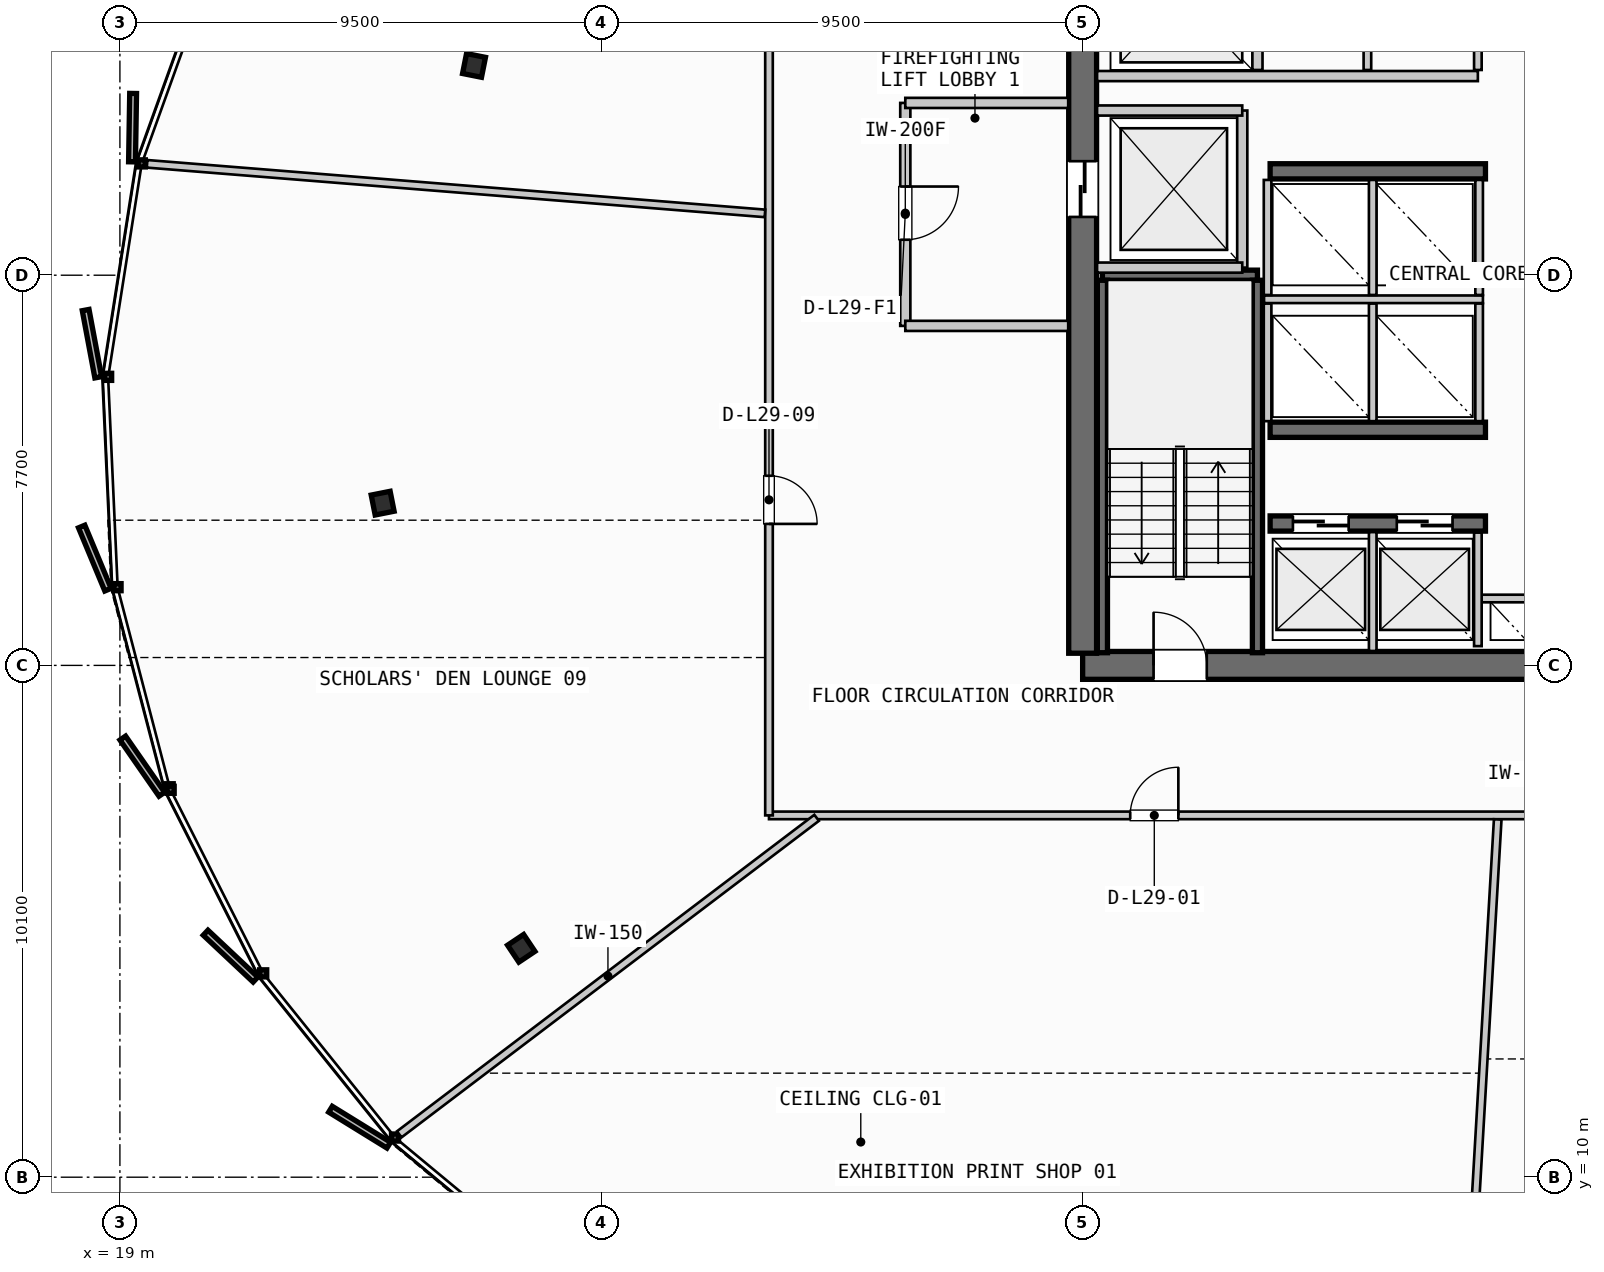
"""IFC4 building model, lengths in metres.
Left out: names, types, materials, properties, quantities, classifications, styles, units other than length and angle.
Written with IfcOpenShell. Run it as: python <this file> out.ifc"""

import sys

from ifc_helpers import new_model, si_unit, direction, frame, frame_2d, origin, origin_2d, place, context, subcontext, project, spatial, rectangle, i_section, extrude, source, transform, mapped, element, fill, save


model = new_model("IFC4")
c1 = context("Model", 3, precision=1e-05, world=origin(), true_north=direction((0.0, 1.0)))
c2 = subcontext(c1, "Body", "Model", "MODEL_VIEW")
j1 = project(units=[si_unit("LENGTHUNIT", "METRE"), si_unit("PLANEANGLEUNIT", "RADIAN")], contexts=[c1])
p1 = place(None, origin())
s1 = spatial("IfcSite", under=j1, at=p1, CompositionType="ELEMENT")
p2 = place(p1, origin())
s2 = spatial("IfcBuilding", under=s1, at=p2, CompositionType="ELEMENT")
p3 = place(p2, frame((0.0, 0.0, 118.0)))
s3 = spatial("IfcBuildingStorey", under=s2, at=p3, CompositionType="ELEMENT", Elevation=118.0)
p4 = place(p3, frame((38.0, 20.1, 0.0), z_axis=(0.0, 0.0, 1.0), x_axis=(1.0, 0.0, 0.0)))
e1 = element("IfcWall", 1, at=p4, inside=s3, PredefinedType="SHEAR", context=c2, shape_type="SweptSolid", body=[
    extrude(rectangle(XDim=17.6, YDim=0.55, at=frame_2d((8.8, 0.0))), origin(), (0.0, 0.0, 1.0), 3.35),
])
p5 = place(p4, frame((1.4, 0.0, 0.0)))
e2 = element("IfcOpeningElement", 2, at=p5, cuts=e1, PredefinedType="OPENING", context=c2, shape_type="SweptSolid", body=[
    extrude(rectangle(XDim=1.05, YDim=2.15, at=frame_2d((0.525, 1.075))), frame((0.0, 0.285, 0.0), z_axis=(0.0, -1.0, 0.0), x_axis=(1.0, 0.0, 0.0)), (0.0, 0.0, 1.0), 0.57),
])
p6 = place(p4, frame((15.15, 0.0, 0.0)))
e3 = element("IfcOpeningElement", 3, at=p6, cuts=e1, PredefinedType="OPENING", context=c2, shape_type="SweptSolid", body=[
    extrude(rectangle(XDim=1.05, YDim=2.15, at=frame_2d((0.525, 1.075))), frame((0.0, 0.285, 0.0), z_axis=(0.0, -1.0, 0.0), x_axis=(1.0, 0.0, 0.0)), (0.0, 0.0, 1.0), 0.57),
])
p7 = place(p3, frame((38.0, 35.26, 0.0), z_axis=(0.0, 0.0, 1.0), x_axis=(0.0, -1.0, 0.0)))
e4 = element("IfcWall", 4, at=p7, inside=s3, PredefinedType="SHEAR", context=c2, shape_type="SweptSolid", body=[
    extrude(rectangle(XDim=14.92, YDim=0.55, at=frame_2d((7.46, 0.0))), origin(), (0.0, 0.0, 1.0), 3.35),
])
p8 = place(p7, frame((5.21, 0.0, 0.0)))
e5 = element("IfcOpeningElement", 5, at=p8, cuts=e4, PredefinedType="OPENING", context=c2, shape_type="SweptSolid", body=[
    extrude(rectangle(XDim=1.1, YDim=2.2, at=frame_2d((0.55, 1.1))), frame((0.0, 0.285, 0.0), z_axis=(0.0, -1.0, 0.0), x_axis=(1.0, 0.0, 0.0)), (0.0, 0.0, 1.0), 0.57),
])
p9 = place(p3, frame((41.7, 22.9, 0.0), z_axis=(0.0, 0.0, 1.0), x_axis=(1.0, 0.0, 0.0)))
e6 = element("IfcWall", 6, at=p9, inside=s3, PredefinedType="SHEAR", context=c2, shape_type="SweptSolid", body=[
    extrude(rectangle(XDim=4.25, YDim=0.3, at=frame_2d((2.125, 0.0))), origin(), (0.0, 0.0, 1.0), 3.35),
])
p10 = place(p9, frame((0.45, 0.0, 0.0)))
e7 = element("IfcOpeningElement", 7, at=p10, cuts=e6, PredefinedType="OPENING", context=c2, shape_type="SweptSolid", body=[
    extrude(rectangle(XDim=1.1, YDim=2.2, at=frame_2d((0.55, 1.1))), frame((0.0, 0.16, 0.0), z_axis=(0.0, -1.0, 0.0), x_axis=(1.0, 0.0, 0.0)), (0.0, 0.0, 1.0), 0.32),
])
p11 = place(p9, frame((2.5, 0.0, 0.0)))
e8 = element("IfcOpeningElement", 8, at=p11, cuts=e6, PredefinedType="OPENING", context=c2, shape_type="SweptSolid", body=[
    extrude(rectangle(XDim=1.1, YDim=2.2, at=frame_2d((0.55, 1.1))), frame((0.0, 0.16, 0.0), z_axis=(0.0, -1.0, 0.0), x_axis=(1.0, 0.0, 0.0)), (0.0, 0.0, 1.0), 0.32),
])
for number, where, z_axis, x_axis in (
    (9, (41.7, 24.75, 0.0), (0.0, 0.0, 1.0), (1.0, 0.0, 0.0)),
    (10, (41.7, 29.85, 0.0), (0.0, 0.0, 1.0), (1.0, 0.0, 0.0)),
):
    element("IfcWall", number, at=place(p3, frame(where, z_axis=z_axis, x_axis=x_axis)), inside=s3, PredefinedType="SHEAR", context=c2, shape_type="SweptSolid", body=[
        extrude(rectangle(XDim=4.25, YDim=0.3, at=frame_2d((2.125, 0.0))), origin(), (0.0, 0.0, 1.0), 3.35),
    ])
m1 = source(origin(), c2, "Body", "SweptSolid", [
    extrude(i_section(OverallWidth=0.401, OverallDepth=0.381, WebThickness=0.032, FlangeThickness=0.051, FilletRadius=0.015, at=origin_2d()), origin(), (0.0, 0.0, 1.0), 3.35),
])
for number, where, z_axis, x_axis in (
    (11, (25.989, 31.94, 0.0), (0.0, 0.0, 1.0), (-0.981, 0.195, 0.0)),
    (12, (24.185, 23.302, 0.0), (0.0, 0.0, 1.0), (-0.981, -0.195, 0.0)),
    (13, (26.921, 14.517, 0.0), (0.0, 0.0, 1.0), (-0.831, -0.556, 0.0)),
):
    element("IfcColumn", number, at=place(p3, frame(where, z_axis=z_axis, x_axis=x_axis)), inside=s3, PredefinedType="COLUMN", context=c2, shape_type="MappedRepresentation", body=[
        mapped(m1, transform((0.0, 0.0, 0.0), scale=1.0)),
    ])
p12 = place(p3, frame((38.39, 27.8, 0.0), z_axis=(0.0, 0.0, 1.0), x_axis=(1.0, 0.0, 0.0)))
e14 = element("IfcWall", 14, at=p12, inside=s3, PredefinedType="SHEAR", context=c2, shape_type="SweptSolid", body=[
    extrude(rectangle(XDim=3.06, YDim=0.2, at=frame_2d((1.53, 0.0))), origin(), (0.0, 0.0, 1.0), 3.35),
])
for number, where, z_axis, x_axis in (
    (15, (41.45, 27.7, 0.0), (0.0, 0.0, 1.0), (0.0, -1.0, 0.0)),
    (16, (38.39, 20.35, 0.0), (0.0, 0.0, 1.0), (0.0, 1.0, 0.0)),
):
    element("IfcWall", number, at=place(p3, frame(where, z_axis=z_axis, x_axis=x_axis)), inside=s3, PredefinedType="SHEAR", context=c2, shape_type="SweptSolid", body=[
        extrude(rectangle(XDim=7.35, YDim=0.2, at=frame_2d((3.675, 0.0))), origin(), (0.0, 0.0, 1.0), 3.35),
    ])
p13 = place(p3, frame((45.8, 21.42, 0.0), z_axis=(0.0, 0.0, 1.0), x_axis=(1.0, 0.0, 0.0)))
e17 = element("IfcWall", 17, at=p13, inside=s3, PredefinedType="PARTITIONING", context=c2, shape_type="SweptSolid", body=[
    extrude(rectangle(XDim=2.0, YDim=0.15, at=frame_2d((1.0, 0.0))), origin(), (0.0, 0.0, 1.0), 2.775),
])
p14 = place(p3, frame((45.8, 20.48, 0.0), z_axis=(0.0, 0.0, 1.0), x_axis=(0.0, 1.0, 0.0)))
e18 = element("IfcWall", 18, at=p14, inside=s3, PredefinedType="PARTITIONING", context=c2, shape_type="SweptSolid", body=[
    extrude(rectangle(XDim=2.24, YDim=0.15, at=frame_2d((1.12, 0.0))), origin(), (0.0, 0.0, 1.0), 2.775),
])
p15 = place(p3, frame((41.15, 27.95, 0.0), z_axis=(0.0, 0.0, 1.0), x_axis=(0.0, 1.0, 0.0)))
e19 = element("IfcWall", 19, at=p15, inside=s3, PredefinedType="PARTITIONING", context=c2, shape_type="SweptSolid", body=[
    extrude(rectangle(XDim=3.1, YDim=0.2, at=frame_2d((1.55, 0.0))), origin(), (0.0, 0.0, 1.0), 2.775),
])
for number, where, z_axis, x_axis in (
    (20, (38.285, 27.95, 0.0), (0.0, 0.0, 1.0), (1.0, 0.0, 0.0)),
    (21, (38.285, 31.05, 0.0), (0.0, 0.0, 1.0), (1.0, 0.0, 0.0)),
):
    element("IfcWall", number, at=place(p3, frame(where, z_axis=z_axis, x_axis=x_axis)), inside=s3, PredefinedType="PARTITIONING", context=c2, shape_type="SweptSolid", body=[
        extrude(rectangle(XDim=2.865, YDim=0.2, at=frame_2d((1.433, 0.0))), origin(), (0.0, 0.0, 1.0), 2.775),
    ])
p16 = place(p3, frame((34.5, 31.2, 0.0), z_axis=(0.0, 0.0, 1.0), x_axis=(0.0, -1.0, 0.0)))
e22 = element("IfcWall", 22, at=p16, inside=s3, PredefinedType="PARTITIONING", context=c2, shape_type="SweptSolid", body=[
    extrude(rectangle(XDim=4.4, YDim=0.2, at=frame_2d((2.2, 0.0))), origin(), (0.0, 0.0, 1.0), 2.775),
])
p17 = place(p16, frame((1.65, 0.0, 0.0)))
e23 = element("IfcOpeningElement", 23, at=p17, cuts=e22, PredefinedType="OPENING", context=c2, shape_type="SweptSolid", body=[
    extrude(rectangle(XDim=1.05, YDim=2.15, at=frame_2d((0.525, 1.075))), frame((0.0, 0.11, 0.0), z_axis=(0.0, -1.0, 0.0), x_axis=(1.0, 0.0, 0.0)), (0.0, 0.0, 1.0), 0.22),
])
for number, where, z_axis, x_axis in (
    (24, (34.5, 26.8, 0.0), (0.0, 0.0, 1.0), (1.0, 0.0, 0.0)),
    (25, (34.5, 31.2, 0.0), (0.0, 0.0, 1.0), (1.0, 0.0, 0.0)),
):
    element("IfcWall", number, at=place(p3, frame(where, z_axis=z_axis, x_axis=x_axis)), inside=s3, PredefinedType="PARTITIONING", context=c2, shape_type="SweptSolid", body=[
        extrude(rectangle(XDim=3.215, YDim=0.2, at=frame_2d((1.607, 0.0))), origin(), (0.0, 0.0, 1.0), 2.775),
    ])
p18 = place(p3, frame((43.725, 20.385, 0.0), z_axis=(0.0, 0.0, 1.0), x_axis=(0.0, 1.0, 0.0)))
e26 = element("IfcWall", 26, at=p18, inside=s3, PredefinedType="PARTITIONING", context=c2, shape_type="SweptSolid", body=[
    extrude(rectangle(XDim=2.345, YDim=0.15, at=frame_2d((1.172, 0.0))), origin(), (0.0, 0.0, 1.0), 2.775),
])
p19 = place(p3, frame((41.58, 27.325, 0.0), z_axis=(0.0, 0.0, 1.0), x_axis=(1.0, 0.0, 0.0)))
e27 = element("IfcWall", 27, at=p19, inside=s3, PredefinedType="PARTITIONING", context=c2, shape_type="SweptSolid", body=[
    extrude(rectangle(XDim=4.32, YDim=0.15, at=frame_2d((2.16, 0.0))), origin(), (0.0, 0.0, 1.0), 2.775),
])
for number, where, z_axis, x_axis in (
    (28, (41.65, 24.92, 0.0), (0.0, 0.0, 1.0), (0.0, 1.0, 0.0)),
    (29, (43.725, 24.92, 0.0), (0.0, 0.0, 1.0), (0.0, 1.0, 0.0)),
    (30, (45.825, 24.92, 0.0), (0.0, 0.0, 1.0), (0.0, 1.0, 0.0)),
):
    element("IfcWall", number, at=place(p3, frame(where, z_axis=z_axis, x_axis=x_axis)), inside=s3, PredefinedType="PARTITIONING", context=c2, shape_type="SweptSolid", body=[
        extrude(rectangle(XDim=2.32, YDim=0.15, at=frame_2d((1.16, 0.0))), origin(), (0.0, 0.0, 1.0), 2.775),
    ])
for number, where, z_axis, x_axis in (
    (31, (41.65, 27.41, 0.0), (0.0, 0.0, 1.0), (0.0, 1.0, 0.0)),
    (32, (43.725, 27.41, 0.0), (0.0, 0.0, 1.0), (0.0, 1.0, 0.0)),
    (33, (45.825, 27.41, 0.0), (0.0, 0.0, 1.0), (0.0, 1.0, 0.0)),
):
    element("IfcWall", number, at=place(p3, frame(where, z_axis=z_axis, x_axis=x_axis)), inside=s3, PredefinedType="PARTITIONING", context=c2, shape_type="SweptSolid", body=[
        extrude(rectangle(XDim=2.27, YDim=0.15, at=frame_2d((1.135, 0.0))), origin(), (0.0, 0.0, 1.0), 2.775),
    ])
p20 = place(p3, frame((41.45, 31.85, 0.0), z_axis=(0.0, 0.0, 1.0), x_axis=(0.0, 1.0, 0.0)))
e34 = element("IfcWall", 34, at=p20, inside=s3, PredefinedType="PARTITIONING", context=c2, shape_type="SweptSolid", body=[
    extrude(rectangle(XDim=3.365, YDim=0.2, at=frame_2d((1.683, 0.0))), origin(), (0.0, 0.0, 1.0), 2.775),
])
p21 = place(p3, frame((38.285, 31.73, 0.0), z_axis=(0.0, 0.0, 1.0), x_axis=(1.0, 0.0, 0.0)))
e35 = element("IfcWall", 35, at=p21, inside=s3, PredefinedType="PARTITIONING", context=c2, shape_type="SweptSolid", body=[
    extrude(rectangle(XDim=7.515, YDim=0.2, at=frame_2d((3.758, 0.0))), origin(), (0.0, 0.0, 1.0), 2.775),
])
p22 = place(p3, frame((45.8, 31.85, 0.0), z_axis=(0.0, 0.0, 1.0), x_axis=(0.0, 1.0, 0.0)))
e36 = element("IfcWall", 36, at=p22, inside=s3, PredefinedType="PARTITIONING", context=c2, shape_type="SweptSolid", body=[
    extrude(rectangle(XDim=3.365, YDim=0.15, at=frame_2d((1.683, 0.0))), origin(), (0.0, 0.0, 1.0), 2.775),
])
p23 = place(p3, frame((43.62, 31.85, 0.0), z_axis=(0.0, 0.0, 1.0), x_axis=(0.0, 1.0, 0.0)))
e37 = element("IfcWall", 37, at=p23, inside=s3, PredefinedType="PLUMBINGWALL", context=c2, shape_type="SweptSolid", body=[
    extrude(rectangle(XDim=3.365, YDim=0.15, at=frame_2d((1.683, 0.0))), origin(), (0.0, 0.0, 1.0), 2.775),
])
p24 = place(p3, frame((31.81, 17.14, 0.0), z_axis=(0.0, 0.0, 1.0), x_axis=(1.0, 0.0, 0.0)))
e38 = element("IfcWall", 38, at=p24, inside=s3, PredefinedType="PARTITIONING", context=c2, shape_type="SweptSolid", body=[
    extrude(rectangle(XDim=29.98, YDim=0.15, at=frame_2d((14.99, 0.0))), origin(), (0.0, 0.0, 1.0), 2.775),
])
p25 = place(p24, frame((7.129, 0.0, 0.0)))
e39 = element("IfcOpeningElement", 39, at=p25, cuts=e38, PredefinedType="OPENING", context=c2, shape_type="SweptSolid", body=[
    extrude(rectangle(XDim=0.95, YDim=2.15, at=frame_2d((0.475, 1.075))), frame((0.0, 0.085, 0.0), z_axis=(0.0, -1.0, 0.0), x_axis=(1.0, 0.0, 0.0)), (0.0, 0.0, 1.0), 0.17),
])
p26 = place(p24, frame((19.544, 0.0, 0.0)))
e40 = element("IfcOpeningElement", 40, at=p26, cuts=e38, PredefinedType="OPENING", context=c2, shape_type="SweptSolid", body=[
    extrude(rectangle(XDim=0.95, YDim=2.15, at=frame_2d((0.475, 1.075))), frame((0.0, 0.085, 0.0), z_axis=(0.0, -1.0, 0.0), x_axis=(1.0, 0.0, 0.0)), (0.0, 0.0, 1.0), 0.17),
])
p27 = place(p3, frame((31.81, 38.46, 0.0), z_axis=(0.0, 0.0, 1.0), x_axis=(0.0, -1.0, 0.0)))
e41 = element("IfcWall", 41, at=p27, inside=s3, PredefinedType="PARTITIONING", context=c2, shape_type="SweptSolid", body=[
    extrude(rectangle(XDim=21.32, YDim=0.15, at=frame_2d((10.66, 0.0))), origin(), (0.0, 0.0, 1.0), 2.775),
])
p28 = place(p27, frame((4.538, 0.0, 0.0)))
e42 = element("IfcOpeningElement", 42, at=p28, cuts=e41, PredefinedType="OPENING", context=c2, shape_type="SweptSolid", body=[
    extrude(rectangle(XDim=0.95, YDim=2.15, at=frame_2d((0.475, 1.075))), frame((0.0, 0.085, 0.0), z_axis=(0.0, -1.0, 0.0), x_axis=(1.0, 0.0, 0.0)), (0.0, 0.0, 1.0), 0.17),
])
p29 = place(p27, frame((14.618, 0.0, 0.0)))
e43 = element("IfcOpeningElement", 43, at=p29, cuts=e41, PredefinedType="OPENING", context=c2, shape_type="SweptSolid", body=[
    extrude(rectangle(XDim=0.95, YDim=2.15, at=frame_2d((0.475, 1.075))), frame((0.0, 0.085, 0.0), z_axis=(0.0, -1.0, 0.0), x_axis=(1.0, 0.0, 0.0)), (0.0, 0.0, 1.0), 0.17),
])
p30 = place(p3, frame((32.75, 17.092, 0.0), z_axis=(0.0, 0.0, 1.0), x_axis=(-0.7968202688, -0.604216400993, 0.0)))
e44 = element("IfcWall", 44, at=p30, inside=s3, PredefinedType="PARTITIONING", context=c2, shape_type="SweptSolid", body=[
    extrude(rectangle(XDim=10.337, YDim=0.15, at=frame_2d((5.168, 0.0))), origin(), (0.0, 0.0, 1.0), 2.775),
])
p31 = place(p3, frame((46.192, 17.06, 0.0), z_axis=(0.0, 0.0, 1.0), x_axis=(-0.058241361623, -0.998302531198, 0.0)))
e45 = element("IfcWall", 45, at=p31, inside=s3, PredefinedType="PARTITIONING", context=c2, shape_type="SweptSolid", body=[
    extrude(rectangle(XDim=13.28, YDim=0.15, at=frame_2d((6.64, 0.0))), origin(), (0.0, 0.0, 1.0), 2.775),
])
p32 = place(p3, frame((31.73, 29.02, 0.0), z_axis=(0.0, 0.0, 1.0), x_axis=(-0.99679742231, 0.079968111622, 0.0)))
e46 = element("IfcWall", 46, at=p32, inside=s3, PredefinedType="PARTITIONING", context=c2, shape_type="SweptSolid", body=[
    extrude(rectangle(XDim=12.233, YDim=0.15, at=frame_2d((6.117, 0.0))), origin(), (0.0, 0.0, 1.0), 2.775),
])
m2 = source(origin(), c2, "Body", "SweptSolid", [
    extrude(rectangle(XDim=1.05, YDim=2.15, at=frame_2d((0.525, 1.075))), frame((0.0, 0.025, 0.0), z_axis=(0.0, -1.0, 0.0), x_axis=(1.0, 0.0, 0.0)), (0.0, 0.0, 1.0), 0.05),
])
p33 = place(p5, origin())
e47 = element("IfcDoor", 47, at=p33, inside=s3, OperationType="SINGLE_SWING_LEFT", PredefinedType="DOOR", context=c2, shape_type="MappedRepresentation", body=[
    mapped(m2, transform((0.0, 0.0, 0.0), scale=1.0)),
])
fill(e2, e47)
m3 = source(origin(), c2, "Body", "SweptSolid", [
    extrude(rectangle(XDim=1.1, YDim=2.2, at=frame_2d((0.55, 1.1))), frame((0.0, 0.025, 0.0), z_axis=(0.0, -1.0, 0.0), x_axis=(1.0, 0.0, 0.0)), (0.0, 0.0, 1.0), 0.05),
])
p34 = place(p8, origin())
e48 = element("IfcDoor", 48, at=p34, inside=s3, OperationType="SLIDING_TO_LEFT", PredefinedType="DOOR", context=c2, shape_type="MappedRepresentation", body=[
    mapped(m3, transform((0.0, 0.0, 0.0), scale=1.0)),
])
fill(e5, e48)
p35 = place(p10, origin())
e49 = element("IfcDoor", 49, at=p35, inside=s3, OperationType="SLIDING_TO_LEFT", PredefinedType="DOOR", context=c2, shape_type="MappedRepresentation", body=[
    mapped(m3, transform((0.0, 0.0, 0.0), scale=1.0)),
])
fill(e7, e49)
p36 = place(p11, origin())
e50 = element("IfcDoor", 50, at=p36, inside=s3, OperationType="SLIDING_TO_LEFT", PredefinedType="DOOR", context=c2, shape_type="MappedRepresentation", body=[
    mapped(m3, transform((0.0, 0.0, 0.0), scale=1.0)),
])
fill(e8, e50)
p37 = place(p17, origin())
e51 = element("IfcDoor", 51, at=p37, inside=s3, OperationType="SINGLE_SWING_LEFT", PredefinedType="DOOR", context=c2, shape_type="MappedRepresentation", body=[
    mapped(m2, transform((0.0, 0.0, 0.0), scale=1.0)),
])
fill(e23, e51)
m4 = source(origin(), c2, "Body", "SweptSolid", [
    extrude(rectangle(XDim=0.95, YDim=2.15, at=frame_2d((0.475, 1.075))), frame((0.0, 0.025, 0.0), z_axis=(0.0, -1.0, 0.0), x_axis=(1.0, 0.0, 0.0)), (0.0, 0.0, 1.0), 0.05),
])
p38 = place(p25, origin())
e52 = element("IfcDoor", 52, at=p38, inside=s3, OperationType="SINGLE_SWING_RIGHT", PredefinedType="DOOR", context=c2, shape_type="MappedRepresentation", body=[
    mapped(m4, transform((0.0, 0.0, 0.0), scale=1.0)),
])
fill(e39, e52)
p39 = place(p29, origin())
e53 = element("IfcDoor", 53, at=p39, inside=s3, OperationType="SINGLE_SWING_RIGHT", PredefinedType="DOOR", context=c2, shape_type="MappedRepresentation", body=[
    mapped(m4, transform((0.0, 0.0, 0.0), scale=1.0)),
])
fill(e43, e53)
save(model, sys.argv[1])
